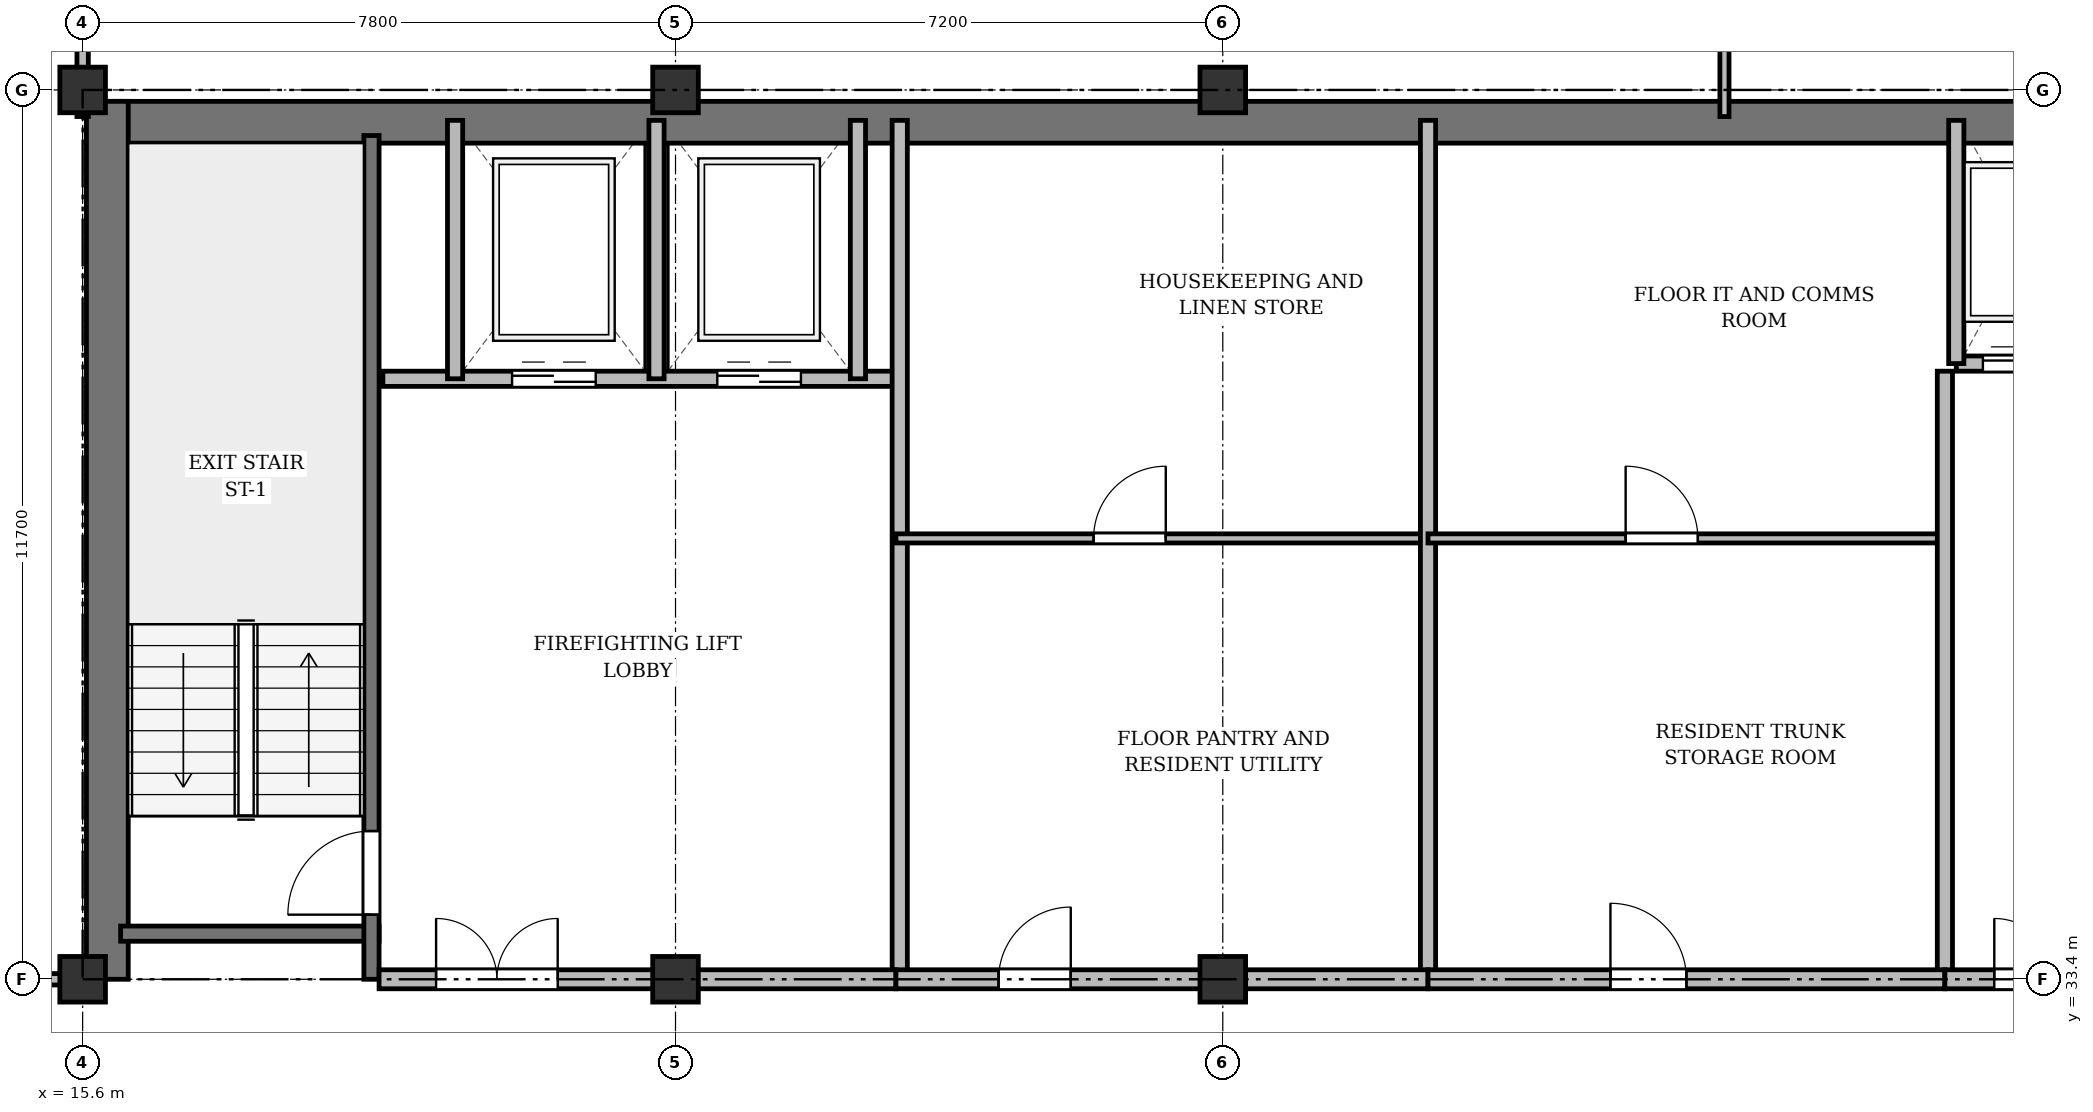
"""IFC4 building model, lengths in metres.
Left out: names, types, materials, properties, quantities, classifications, styles, units other than length and angle.
Written with IfcOpenShell. Run it as: python <this file> out.ifc"""

import sys

from ifc_helpers import new_model, si_unit, direction, frame, frame_2d, origin, origin_2d, place, context, subcontext, project, spatial, rectangle, extrude, source, transform, mapped, element, fill, save


model = new_model("IFC4")
c1 = context("Model", 3, precision=1e-05, world=origin(), true_north=direction((0.0, 1.0)))
c2 = subcontext(c1, "Body", "Model", "MODEL_VIEW")
j1 = project(units=[si_unit("LENGTHUNIT", "METRE"), si_unit("PLANEANGLEUNIT", "RADIAN")], contexts=[c1])
p1 = place(None, origin())
s1 = spatial("IfcSite", under=j1, at=p1, CompositionType="ELEMENT")
p2 = place(p1, origin())
s2 = spatial("IfcBuilding", under=s1, at=p2, CompositionType="ELEMENT")
p3 = place(p2, frame((0.0, 0.0, 291.9)))
s3 = spatial("IfcBuildingStorey", under=s2, at=p3, CompositionType="ELEMENT", Elevation=291.9)
m1 = source(origin(), c2, "Body", "SweptSolid", [
    extrude(rectangle(XDim=0.6, YDim=0.6, at=origin_2d()), origin(), (0.0, 0.0, 1.0), 3.6),
])
for number, where, z_axis, x_axis in (
    (1, (15.6, 33.4, 0.0), (0.0, 0.0, 1.0), (1.0, 0.0, 0.0)),
    (2, (15.6, 45.1, 0.0), (0.0, 0.0, 1.0), (1.0, 0.0, 0.0)),
    (3, (23.4, 33.4, 0.0), (0.0, 0.0, 1.0), (1.0, 0.0, 0.0)),
    (4, (23.4, 45.1, 0.0), (0.0, 0.0, 1.0), (1.0, 0.0, 0.0)),
    (5, (30.6, 33.4, 0.0), (0.0, 0.0, 1.0), (1.0, 0.0, 0.0)),
    (6, (30.6, 45.1, 0.0), (0.0, 0.0, 1.0), (1.0, 0.0, 0.0)),
):
    element("IfcColumn", number, at=place(p3, frame(where, z_axis=z_axis, x_axis=x_axis)), inside=s3, PredefinedType="COLUMN", context=c2, shape_type="MappedRepresentation", body=[
        mapped(m1, transform((0.0, 0.0, 0.0), x_axis=(1.0, 0.0, 0.0), y_axis=(0.0, 1.0, 0.0), z_axis=(0.0, 0.0, 1.0), scale=1.0)),
    ])
p4 = place(p3, frame((15.65, 44.675, 0.0), z_axis=(0.0, 0.0, 1.0), x_axis=(1.0, 0.0, 0.0)))
e7 = element("IfcWall", 7, at=p4, inside=s3, PredefinedType="SHEAR", context=c2, shape_type="SweptSolid", body=[
    extrude(rectangle(XDim=43.1, YDim=0.55, at=frame_2d((21.55, 0.0))), origin(), (0.0, 0.0, 1.0), 3.18),
])
p5 = place(p3, frame((15.925, 33.4, 0.0), z_axis=(0.0, 0.0, 1.0), x_axis=(0.0, 1.0, 0.0)))
e8 = element("IfcWall", 8, at=p5, inside=s3, PredefinedType="SHEAR", context=c2, shape_type="SweptSolid", body=[
    extrude(rectangle(XDim=11.55, YDim=0.55, at=frame_2d((5.775, 0.0))), origin(), (0.0, 0.0, 1.0), 3.18),
])
p6 = place(p3, frame((16.1, 34.0, 0.0), z_axis=(0.0, 0.0, 1.0), x_axis=(1.0, 0.0, 0.0)))
e9 = element("IfcWall", 9, at=p6, inside=s3, PredefinedType="SHEAR", context=c2, shape_type="SweptSolid", body=[
    extrude(rectangle(XDim=3.4, YDim=0.2, at=frame_2d((1.7, 0.0))), origin(), (0.0, 0.0, 1.0), 3.18),
])
p7 = place(p3, frame((19.4, 33.4, 0.0), z_axis=(0.0, 0.0, 1.0), x_axis=(0.0, 1.0, 0.0)))
e10 = element("IfcWall", 10, at=p7, inside=s3, PredefinedType="SHEAR", context=c2, shape_type="SweptSolid", body=[
    extrude(rectangle(XDim=11.1, YDim=0.2, at=frame_2d((5.55, 0.0))), origin(), (0.0, 0.0, 1.0), 3.18),
])
p8 = place(p7, frame((0.85, 0.0, 0.0)))
e11 = element("IfcOpeningElement", 11, at=p8, cuts=e10, PredefinedType="OPENING", context=c2, shape_type="SweptSolid", body=[
    extrude(rectangle(XDim=1.1, YDim=2.15, at=frame_2d((0.55, 1.075))), frame((0.0, 0.11, 0.0), z_axis=(0.0, -1.0, 0.0), x_axis=(1.0, 0.0, 0.0)), (0.0, 0.0, 1.0), 0.22),
])
p9 = place(p3, frame((19.55, 41.3, 0.0), z_axis=(0.0, 0.0, 1.0), x_axis=(1.0, 0.0, 0.0)))
e12 = element("IfcWall", 12, at=p9, inside=s3, PredefinedType="SOLIDWALL", context=c2, shape_type="SweptSolid", body=[
    extrude(rectangle(XDim=6.75, YDim=0.2, at=frame_2d((3.375, 0.0))), origin(), (0.0, 0.0, 1.0), 3.18),
])
p10 = place(p9, frame((1.7, 0.0, 0.0)))
e13 = element("IfcOpeningElement", 13, at=p10, cuts=e12, PredefinedType="OPENING", context=c2, shape_type="SweptSolid", body=[
    extrude(rectangle(XDim=1.1, YDim=2.15, at=frame_2d((0.55, 1.075))), frame((0.0, 0.11, 0.0), z_axis=(0.0, -1.0, 0.0), x_axis=(1.0, 0.0, 0.0)), (0.0, 0.0, 1.0), 0.22),
])
p11 = place(p9, frame((4.4, 0.0, 0.0)))
e14 = element("IfcOpeningElement", 14, at=p11, cuts=e12, PredefinedType="OPENING", context=c2, shape_type="SweptSolid", body=[
    extrude(rectangle(XDim=1.1, YDim=2.15, at=frame_2d((0.55, 1.075))), frame((0.0, 0.11, 0.0), z_axis=(0.0, -1.0, 0.0), x_axis=(1.0, 0.0, 0.0)), (0.0, 0.0, 1.0), 0.22),
])
for number, where, z_axis, x_axis in (
    (15, (20.5, 41.3, 0.0), (0.0, 0.0, 1.0), (0.0, 1.0, 0.0)),
    (16, (23.15, 41.3, 0.0), (0.0, 0.0, 1.0), (0.0, 1.0, 0.0)),
    (17, (25.8, 41.3, 0.0), (0.0, 0.0, 1.0), (0.0, 1.0, 0.0)),
):
    element("IfcWall", number, at=place(p3, frame(where, z_axis=z_axis, x_axis=x_axis)), inside=s3, PredefinedType="SOLIDWALL", context=c2, shape_type="SweptSolid", body=[
        extrude(rectangle(XDim=3.4, YDim=0.2, at=frame_2d((1.7, 0.0))), origin(), (0.0, 0.0, 1.0), 3.18),
    ])
p12 = place(p3, frame((26.35, 33.4, 0.0), z_axis=(0.0, 0.0, 1.0), x_axis=(0.0, 1.0, 0.0)))
e18 = element("IfcWall", 18, at=p12, inside=s3, PredefinedType="SOLIDWALL", context=c2, shape_type="SweptSolid", body=[
    extrude(rectangle(XDim=11.3, YDim=0.2, at=frame_2d((5.65, 0.0))), origin(), (0.0, 0.0, 1.0), 2.73),
])
p13 = place(p3, frame((19.5, 33.4, 0.0), z_axis=(0.0, 0.0, 1.0), x_axis=(1.0, 0.0, 0.0)))
e19 = element("IfcWall", 19, at=p13, inside=s3, PredefinedType="PARTITIONING", context=c2, shape_type="SweptSolid", body=[
    extrude(rectangle(XDim=6.8, YDim=0.25, at=frame_2d((3.4, 0.0))), origin(), (0.0, 0.0, 1.0), 2.73),
])
p14 = place(p13, frame((0.75, 0.0, 0.0)))
e20 = element("IfcOpeningElement", 20, at=p14, cuts=e19, PredefinedType="OPENING", context=c2, shape_type="SweptSolid", body=[
    extrude(rectangle(XDim=1.6, YDim=2.2, at=frame_2d((0.8, 1.1))), frame((0.0, 0.135, 0.0), z_axis=(0.0, -1.0, 0.0), x_axis=(1.0, 0.0, 0.0)), (0.0, 0.0, 1.0), 0.27),
])
p15 = place(p3, frame((26.3, 39.2, 0.0), z_axis=(0.0, 0.0, 1.0), x_axis=(1.0, 0.0, 0.0)))
e21 = element("IfcWall", 21, at=p15, inside=s3, PredefinedType="PARTITIONING", context=c2, shape_type="SweptSolid", body=[
    extrude(rectangle(XDim=7.0, YDim=0.12, at=frame_2d((3.5, 0.0))), origin(), (0.0, 0.0, 1.0), 2.68),
])
p16 = place(p15, frame((2.6, 0.0, 0.0)))
e22 = element("IfcOpeningElement", 22, at=p16, cuts=e21, PredefinedType="OPENING", context=c2, shape_type="SweptSolid", body=[
    extrude(rectangle(XDim=0.95, YDim=2.15, at=frame_2d((0.475, 1.075))), frame((0.0, 0.07, 0.0), z_axis=(0.0, -1.0, 0.0), x_axis=(1.0, 0.0, 0.0)), (0.0, 0.0, 1.0), 0.14),
])
p17 = place(p3, frame((33.3, 33.4, 0.0), z_axis=(0.0, 0.0, 1.0), x_axis=(0.0, 1.0, 0.0)))
e23 = element("IfcWall", 23, at=p17, inside=s3, PredefinedType="SOLIDWALL", context=c2, shape_type="SweptSolid", body=[
    extrude(rectangle(XDim=11.3, YDim=0.2, at=frame_2d((5.65, 0.0))), origin(), (0.0, 0.0, 1.0), 2.73),
])
p18 = place(p3, frame((33.3, 39.2, 0.0), z_axis=(0.0, 0.0, 1.0), x_axis=(1.0, 0.0, 0.0)))
e24 = element("IfcWall", 24, at=p18, inside=s3, PredefinedType="PARTITIONING", context=c2, shape_type="SweptSolid", body=[
    extrude(rectangle(XDim=6.8, YDim=0.12, at=frame_2d((3.4, 0.0))), origin(), (0.0, 0.0, 1.0), 3.18),
])
p19 = place(p18, frame((2.6, 0.0, 0.0)))
e25 = element("IfcOpeningElement", 25, at=p19, cuts=e24, PredefinedType="OPENING", context=c2, shape_type="SweptSolid", body=[
    extrude(rectangle(XDim=0.95, YDim=2.15, at=frame_2d((0.475, 1.075))), frame((0.0, 0.07, 0.0), z_axis=(0.0, -1.0, 0.0), x_axis=(1.0, 0.0, 0.0)), (0.0, 0.0, 1.0), 0.14),
])
p20 = place(p3, frame((40.1, 33.4, 0.0), z_axis=(0.0, 0.0, 1.0), x_axis=(0.0, 1.0, 0.0)))
e26 = element("IfcWall", 26, at=p20, inside=s3, PredefinedType="SOLIDWALL", context=c2, shape_type="SweptSolid", body=[
    extrude(rectangle(XDim=8.0, YDim=0.2, at=frame_2d((4.0, 0.0))), origin(), (0.0, 0.0, 1.0), 2.73),
])
p21 = place(p3, frame((40.25, 41.5, 0.0), z_axis=(0.0, 0.0, 1.0), x_axis=(1.0, 0.0, 0.0)))
e27 = element("IfcWall", 27, at=p21, inside=s3, PredefinedType="SOLIDWALL", context=c2, shape_type="SweptSolid", body=[
    extrude(rectangle(XDim=6.9, YDim=0.2, at=frame_2d((3.45, 0.0))), origin(), (0.0, 0.0, 1.0), 3.18),
])
p22 = place(p21, frame((0.35, 0.0, 0.0)))
e28 = element("IfcOpeningElement", 28, at=p22, cuts=e27, PredefinedType="OPENING", context=c2, shape_type="SweptSolid", body=[
    extrude(rectangle(XDim=1.05, YDim=2.15, at=frame_2d((0.525, 1.075))), frame((0.0, 0.11, 0.0), z_axis=(0.0, -1.0, 0.0), x_axis=(1.0, 0.0, 0.0)), (0.0, 0.0, 1.0), 0.22),
])
p23 = place(p21, frame((2.05, 0.0, 0.0)))
e29 = element("IfcOpeningElement", 29, at=p23, cuts=e27, PredefinedType="OPENING", context=c2, shape_type="SweptSolid", body=[
    extrude(rectangle(XDim=1.05, YDim=2.15, at=frame_2d((0.525, 1.075))), frame((0.0, 0.11, 0.0), z_axis=(0.0, -1.0, 0.0), x_axis=(1.0, 0.0, 0.0)), (0.0, 0.0, 1.0), 0.22),
])
p24 = place(p21, frame((3.75, 0.0, 0.0)))
e30 = element("IfcOpeningElement", 30, at=p24, cuts=e27, PredefinedType="OPENING", context=c2, shape_type="SweptSolid", body=[
    extrude(rectangle(XDim=1.05, YDim=2.15, at=frame_2d((0.525, 1.075))), frame((0.0, 0.11, 0.0), z_axis=(0.0, -1.0, 0.0), x_axis=(1.0, 0.0, 0.0)), (0.0, 0.0, 1.0), 0.22),
])
p25 = place(p21, frame((5.45, 0.0, 0.0)))
e31 = element("IfcOpeningElement", 31, at=p25, cuts=e27, PredefinedType="OPENING", context=c2, shape_type="SweptSolid", body=[
    extrude(rectangle(XDim=1.05, YDim=2.15, at=frame_2d((0.525, 1.075))), frame((0.0, 0.11, 0.0), z_axis=(0.0, -1.0, 0.0), x_axis=(1.0, 0.0, 0.0)), (0.0, 0.0, 1.0), 0.22),
])
p26 = place(p3, frame((40.25, 41.5, 0.0), z_axis=(0.0, 0.0, 1.0), x_axis=(0.0, 1.0, 0.0)))
e32 = element("IfcWall", 32, at=p26, inside=s3, PredefinedType="SOLIDWALL", context=c2, shape_type="SweptSolid", body=[
    extrude(rectangle(XDim=3.2, YDim=0.2, at=frame_2d((1.6, 0.0))), origin(), (0.0, 0.0, 1.0), 3.18),
])
p27 = place(p3, frame((26.3, 33.4, 0.0), z_axis=(0.0, 0.0, 1.0), x_axis=(1.0, 0.0, 0.0)))
e33 = element("IfcWall", 33, at=p27, inside=s3, PredefinedType="PARTITIONING", context=c2, shape_type="SweptSolid", body=[
    extrude(rectangle(XDim=7.0, YDim=0.25, at=frame_2d((3.5, 0.0))), origin(), (0.0, 0.0, 1.0), 2.73),
])
p28 = place(p27, frame((1.35, 0.0, 0.0)))
e34 = element("IfcOpeningElement", 34, at=p28, cuts=e33, PredefinedType="OPENING", context=c2, shape_type="SweptSolid", body=[
    extrude(rectangle(XDim=0.95, YDim=2.15, at=frame_2d((0.475, 1.075))), frame((0.0, 0.135, 0.0), z_axis=(0.0, -1.0, 0.0), x_axis=(1.0, 0.0, 0.0)), (0.0, 0.0, 1.0), 0.27),
])
p29 = place(p3, frame((33.3, 33.4, 0.0), z_axis=(0.0, 0.0, 1.0), x_axis=(1.0, 0.0, 0.0)))
e35 = element("IfcWall", 35, at=p29, inside=s3, PredefinedType="PARTITIONING", context=c2, shape_type="SweptSolid", body=[
    extrude(rectangle(XDim=6.8, YDim=0.25, at=frame_2d((3.4, 0.0))), origin(), (0.0, 0.0, 1.0), 2.73),
])
p30 = place(p29, frame((2.4, 0.0, 0.0)))
e36 = element("IfcOpeningElement", 36, at=p30, cuts=e35, PredefinedType="OPENING", context=c2, shape_type="SweptSolid", body=[
    extrude(rectangle(XDim=1.0, YDim=2.15, at=frame_2d((0.5, 1.075))), frame((0.0, 0.135, 0.0), z_axis=(0.0, -1.0, 0.0), x_axis=(1.0, 0.0, 0.0)), (0.0, 0.0, 1.0), 0.27),
])
p31 = place(p3, frame((40.1, 33.4, 0.0), z_axis=(0.0, 0.0, 1.0), x_axis=(1.0, 0.0, 0.0)))
e37 = element("IfcWall", 37, at=p31, inside=s3, PredefinedType="PARTITIONING", context=c2, shape_type="SweptSolid", body=[
    extrude(rectangle(XDim=7.05, YDim=0.25, at=frame_2d((3.525, 0.0))), origin(), (0.0, 0.0, 1.0), 2.73),
])
p32 = place(p31, frame((0.65, 0.0, 0.0)))
e38 = element("IfcOpeningElement", 38, at=p32, cuts=e37, PredefinedType="OPENING", context=c2, shape_type="SweptSolid", body=[
    extrude(rectangle(XDim=1.6, YDim=2.2, at=frame_2d((0.8, 1.1))), frame((0.0, 0.135, 0.0), z_axis=(0.0, -1.0, 0.0), x_axis=(1.0, 0.0, 0.0)), (0.0, 0.0, 1.0), 0.27),
])
p33 = place(p3, frame((8.45, 33.4, 0.0), z_axis=(0.0, 0.0, 1.0), x_axis=(1.0, 0.0, 0.0)))
e39 = element("IfcWall", 39, at=p33, inside=s3, PredefinedType="PARTITIONING", context=c2, shape_type="SweptSolid", body=[
    extrude(rectangle(XDim=7.15, YDim=0.15, at=frame_2d((3.575, 0.0))), origin(), (0.0, 0.0, 1.0), 2.53),
])
p34 = place(p33, frame((3.0, 0.0, 0.0)))
e40 = element("IfcOpeningElement", 40, at=p34, cuts=e39, PredefinedType="OPENING", context=c2, shape_type="SweptSolid", body=[
    extrude(rectangle(XDim=0.95, YDim=2.15, at=frame_2d((0.475, 1.075))), frame((0.0, 0.085, 0.0), z_axis=(0.0, -1.0, 0.0), x_axis=(1.0, 0.0, 0.0)), (0.0, 0.0, 1.0), 0.17),
])
p35 = place(p3, frame((37.2, 44.75, 0.0), z_axis=(0.0, 0.0, 1.0), x_axis=(0.0, 1.0, 0.0)))
e41 = element("IfcWall", 41, at=p35, inside=s3, PredefinedType="PARTITIONING", context=c2, shape_type="SweptSolid", body=[
    extrude(rectangle(XDim=3.61, YDim=0.12, at=frame_2d((1.805, 0.0))), origin(), (0.0, 0.0, 1.0), 2.73),
])
p36 = place(p35, frame((1.1, 0.0, 0.0)))
e42 = element("IfcOpeningElement", 42, at=p36, cuts=e41, PredefinedType="OPENING", context=c2, shape_type="SweptSolid", body=[
    extrude(rectangle(XDim=0.95, YDim=2.15, at=frame_2d((0.475, 1.075))), frame((0.0, 0.07, 0.0), z_axis=(0.0, -1.0, 0.0), x_axis=(1.0, 0.0, 0.0)), (0.0, 0.0, 1.0), 0.14),
])
p37 = place(p3, frame((15.6, 44.75, 0.0), z_axis=(0.0, 0.0, 1.0), x_axis=(0.0, 1.0, 0.0)))
e43 = element("IfcWall", 43, at=p37, inside=s3, PredefinedType="PARTITIONING", context=c2, shape_type="SweptSolid", body=[
    extrude(rectangle(XDim=3.61, YDim=0.15, at=frame_2d((1.805, 0.0))), origin(), (0.0, 0.0, 1.0), 2.68),
])
p38 = place(p37, frame((1.1, 0.0, 0.0)))
e44 = element("IfcOpeningElement", 44, at=p38, cuts=e43, PredefinedType="OPENING", context=c2, shape_type="SweptSolid", body=[
    extrude(rectangle(XDim=0.95, YDim=2.15, at=frame_2d((0.475, 1.075))), frame((0.0, 0.085, 0.0), z_axis=(0.0, -1.0, 0.0), x_axis=(1.0, 0.0, 0.0)), (0.0, 0.0, 1.0), 0.17),
])
m2 = source(origin(), c2, "Body", "SweptSolid", [
    extrude(rectangle(XDim=1.1, YDim=2.15, at=frame_2d((0.55, 1.075))), frame((0.0, 0.025, 0.0), z_axis=(0.0, -1.0, 0.0), x_axis=(1.0, 0.0, 0.0)), (0.0, 0.0, 1.0), 0.05),
])
p39 = place(p8, origin())
e45 = element("IfcDoor", 45, at=p39, inside=s3, OperationType="SINGLE_SWING_LEFT", PredefinedType="DOOR", context=c2, shape_type="MappedRepresentation", body=[
    mapped(m2, transform((0.0, 0.0, 0.0), x_axis=(1.0, 0.0, 0.0), y_axis=(0.0, 1.0, 0.0), z_axis=(0.0, 0.0, 1.0), scale=1.0)),
])
fill(e11, e45)
p40 = place(p10, origin())
e46 = element("IfcDoor", 46, at=p40, inside=s3, OperationType="DOUBLE_DOOR_SLIDING", PredefinedType="DOOR", context=c2, shape_type="MappedRepresentation", body=[
    mapped(m2, transform((0.0, 0.0, 0.0), x_axis=(1.0, 0.0, 0.0), y_axis=(0.0, 1.0, 0.0), z_axis=(0.0, 0.0, 1.0), scale=1.0)),
])
fill(e13, e46)
p41 = place(p11, origin())
e47 = element("IfcDoor", 47, at=p41, inside=s3, OperationType="DOUBLE_DOOR_SLIDING", PredefinedType="DOOR", context=c2, shape_type="MappedRepresentation", body=[
    mapped(m2, transform((0.0, 0.0, 0.0), x_axis=(1.0, 0.0, 0.0), y_axis=(0.0, 1.0, 0.0), z_axis=(0.0, 0.0, 1.0), scale=1.0)),
])
fill(e14, e47)
m3 = source(origin(), c2, "Body", "SweptSolid", [
    extrude(rectangle(XDim=1.6, YDim=2.2, at=frame_2d((0.8, 1.1))), frame((0.0, 0.025, 0.0), z_axis=(0.0, -1.0, 0.0), x_axis=(1.0, 0.0, 0.0)), (0.0, 0.0, 1.0), 0.05),
])
p42 = place(p14, origin())
e48 = element("IfcDoor", 48, at=p42, inside=s3, OperationType="DOUBLE_DOOR_SINGLE_SWING", PredefinedType="DOOR", context=c2, shape_type="MappedRepresentation", body=[
    mapped(m3, transform((0.0, 0.0, 0.0), x_axis=(1.0, 0.0, 0.0), y_axis=(0.0, 1.0, 0.0), z_axis=(0.0, 0.0, 1.0), scale=1.0)),
])
fill(e20, e48)
m4 = source(origin(), c2, "Body", "SweptSolid", [
    extrude(rectangle(XDim=0.95, YDim=2.15, at=frame_2d((0.475, 1.075))), frame((0.0, 0.025, 0.0), z_axis=(0.0, -1.0, 0.0), x_axis=(1.0, 0.0, 0.0)), (0.0, 0.0, 1.0), 0.05),
])
p43 = place(p16, origin())
e49 = element("IfcDoor", 49, at=p43, inside=s3, OperationType="SINGLE_SWING_RIGHT", PredefinedType="DOOR", context=c2, shape_type="MappedRepresentation", body=[
    mapped(m4, transform((0.0, 0.0, 0.0), x_axis=(1.0, 0.0, 0.0), y_axis=(0.0, 1.0, 0.0), z_axis=(0.0, 0.0, 1.0), scale=1.0)),
])
fill(e22, e49)
p44 = place(p19, origin())
e50 = element("IfcDoor", 50, at=p44, inside=s3, OperationType="SINGLE_SWING_LEFT", PredefinedType="DOOR", context=c2, shape_type="MappedRepresentation", body=[
    mapped(m4, transform((0.0, 0.0, 0.0), x_axis=(1.0, 0.0, 0.0), y_axis=(0.0, 1.0, 0.0), z_axis=(0.0, 0.0, 1.0), scale=1.0)),
])
fill(e25, e50)
m5 = source(origin(), c2, "Body", "SweptSolid", [
    extrude(rectangle(XDim=1.05, YDim=2.15, at=frame_2d((0.525, 1.075))), frame((0.0, 0.025, 0.0), z_axis=(0.0, -1.0, 0.0), x_axis=(1.0, 0.0, 0.0)), (0.0, 0.0, 1.0), 0.05),
])
p45 = place(p22, origin())
e51 = element("IfcDoor", 51, at=p45, inside=s3, OperationType="DOUBLE_DOOR_SLIDING", PredefinedType="DOOR", context=c2, shape_type="MappedRepresentation", body=[
    mapped(m5, transform((0.0, 0.0, 0.0), x_axis=(1.0, 0.0, 0.0), y_axis=(0.0, 1.0, 0.0), z_axis=(0.0, 0.0, 1.0), scale=1.0)),
])
fill(e28, e51)
p46 = place(p28, origin())
e52 = element("IfcDoor", 52, at=p46, inside=s3, OperationType="SINGLE_SWING_RIGHT", PredefinedType="DOOR", context=c2, shape_type="MappedRepresentation", body=[
    mapped(m4, transform((0.0, 0.0, 0.0), x_axis=(1.0, 0.0, 0.0), y_axis=(0.0, 1.0, 0.0), z_axis=(0.0, 0.0, 1.0), scale=1.0)),
])
fill(e34, e52)
m6 = source(origin(), c2, "Body", "SweptSolid", [
    extrude(rectangle(XDim=1.0, YDim=2.15, at=frame_2d((0.5, 1.075))), frame((0.0, 0.025, 0.0), z_axis=(0.0, -1.0, 0.0), x_axis=(1.0, 0.0, 0.0)), (0.0, 0.0, 1.0), 0.05),
])
p47 = place(p30, origin())
e53 = element("IfcDoor", 53, at=p47, inside=s3, OperationType="SINGLE_SWING_LEFT", PredefinedType="DOOR", context=c2, shape_type="MappedRepresentation", body=[
    mapped(m6, transform((0.0, 0.0, 0.0), x_axis=(1.0, 0.0, 0.0), y_axis=(0.0, 1.0, 0.0), z_axis=(0.0, 0.0, 1.0), scale=1.0)),
])
fill(e36, e53)
p48 = place(p32, origin())
e54 = element("IfcDoor", 54, at=p48, inside=s3, OperationType="DOUBLE_DOOR_SINGLE_SWING", PredefinedType="DOOR", context=c2, shape_type="MappedRepresentation", body=[
    mapped(m3, transform((0.0, 0.0, 0.0), x_axis=(1.0, 0.0, 0.0), y_axis=(0.0, 1.0, 0.0), z_axis=(0.0, 0.0, 1.0), scale=1.0)),
])
fill(e38, e54)
save(model, sys.argv[1])
